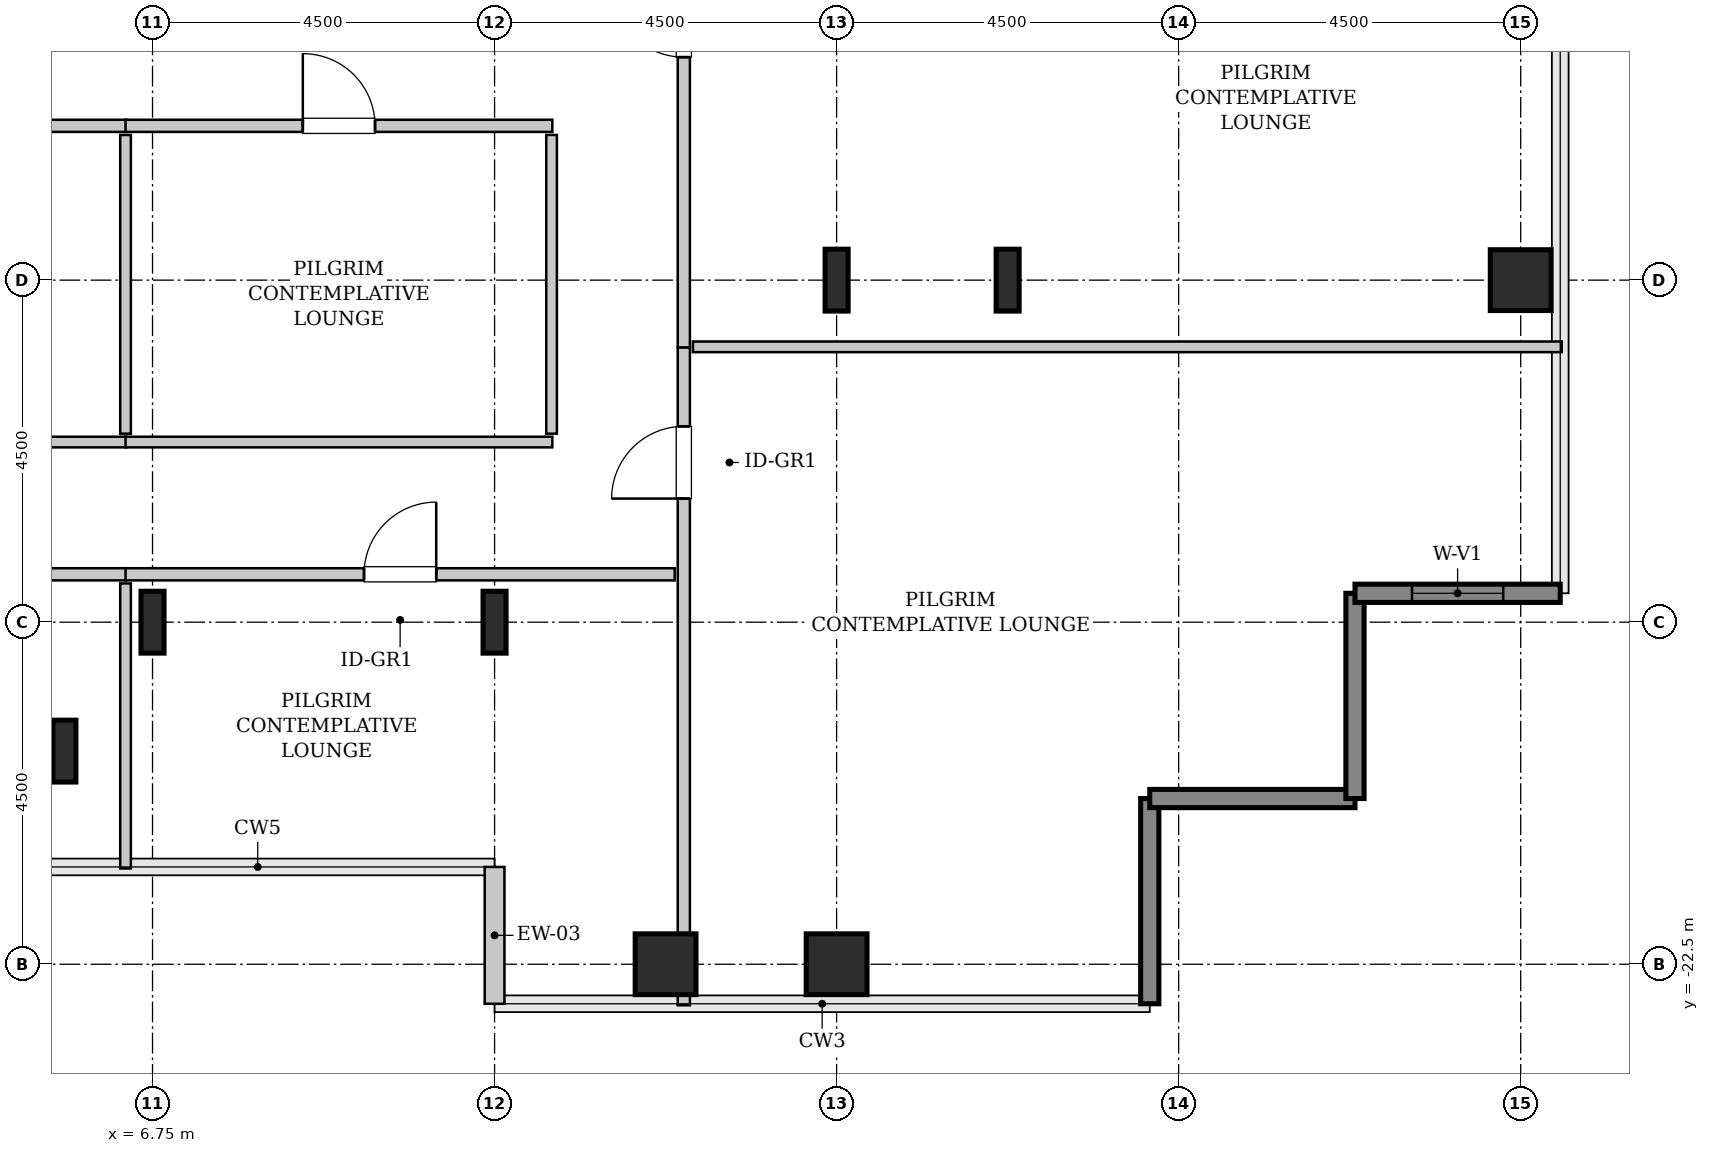
"""IFC4 building model, lengths in metres.
Left out: names, types, materials, properties, quantities, classifications, styles, units other than length and angle.
Written with IfcOpenShell. Run it as: python <this file> out.ifc"""

import sys

from ifc_helpers import new_model, si_unit, direction, frame, frame_2d, origin, origin_2d, place, context, subcontext, project, spatial, rectangle, hollow_rectangle, i_section, extrude, source, transform, mapped, element, fill, save


model = new_model("IFC4")
c1 = context("Model", 3, precision=1e-05, world=origin(), true_north=direction((0.0, 1.0)))
c2 = subcontext(c1, "Body", "Model", "MODEL_VIEW")
j1 = project(units=[si_unit("LENGTHUNIT", "METRE"), si_unit("PLANEANGLEUNIT", "RADIAN")], contexts=[c1])
p1 = place(None, origin())
s1 = spatial("IfcSite", under=j1, at=p1, CompositionType="ELEMENT")
p2 = place(p1, origin())
s2 = spatial("IfcBuilding", under=s1, at=p2, CompositionType="ELEMENT")
p3 = place(p2, frame((0.0, 0.0, 190.6)))
s3 = spatial("IfcBuildingStorey", under=s2, at=p3, CompositionType="ELEMENT", Elevation=190.6)
m1 = source(origin(), c2, "Body", "SweptSolid", [
    extrude(i_section(OverallWidth=0.303, OverallDepth=0.814, WebThickness=0.021, FlangeThickness=0.04, FilletRadius=0.03, at=origin_2d()), origin(), (0.0, 0.0, 1.0), 3.8),
])
for number, where, z_axis, x_axis in (
    (1, (5.591, -19.696, 0.0), (0.0, 0.0, 1.0), (1.0, 0.0, 0.0)),
    (2, (6.75, -18.0, 0.0), (0.0, 0.0, 1.0), (1.0, 0.0, 0.0)),
    (3, (11.25, -18.0, 0.0), (0.0, 0.0, 1.0), (1.0, 0.0, 0.0)),
):
    element("IfcColumn", number, at=place(p3, frame(where, z_axis=z_axis, x_axis=x_axis)), inside=s3, PredefinedType="COLUMN", context=c2, shape_type="MappedRepresentation", body=[
        mapped(m1, transform((0.0, 0.0, 0.0), x_axis=(1.0, 0.0, 0.0), y_axis=(0.0, 1.0, 0.0), z_axis=(0.0, 0.0, 1.0), scale=1.0)),
    ])
m2 = source(origin(), c2, "Body", "SweptSolid", [
    extrude(hollow_rectangle(XDim=0.8, YDim=0.8, WallThickness=0.04, InnerFilletRadius=0.04, OuterFilletRadius=0.08, at=origin_2d()), origin(), (0.0, 0.0, 1.0), 3.8),
])
for number, where, z_axis, x_axis in (
    (4, (13.5, -22.5, 0.0), (0.0, 0.0, 1.0), (1.0, 0.0, 0.0)),
    (5, (15.75, -22.5, 0.0), (0.0, 0.0, 1.0), (1.0, 0.0, 0.0)),
):
    element("IfcColumn", number, at=place(p3, frame(where, z_axis=z_axis, x_axis=x_axis)), inside=s3, PredefinedType="COLUMN", context=c2, shape_type="MappedRepresentation", body=[
        mapped(m2, transform((0.0, 0.0, 0.0), x_axis=(1.0, 0.0, 0.0), y_axis=(0.0, 1.0, 0.0), z_axis=(0.0, 0.0, 1.0), scale=1.0)),
    ])
for number, where, z_axis, x_axis in (
    (6, (15.75, -13.5, 0.0), (0.0, 0.0, 1.0), (1.0, 0.0, 0.0)),
    (7, (18.0, -13.5, 0.0), (0.0, 0.0, 1.0), (1.0, 0.0, 0.0)),
):
    element("IfcColumn", number, at=place(p3, frame(where, z_axis=z_axis, x_axis=x_axis)), inside=s3, PredefinedType="COLUMN", context=c2, shape_type="MappedRepresentation", body=[
        mapped(m1, transform((0.0, 0.0, 0.0), x_axis=(1.0, 0.0, 0.0), y_axis=(0.0, 1.0, 0.0), z_axis=(0.0, 0.0, 1.0), scale=1.0)),
    ])
p4 = place(p3, frame((24.75, -13.5, 0.0), z_axis=(0.0, 0.0, 1.0), x_axis=(1.0, 0.0, 0.0)))
e8 = element("IfcColumn", 8, at=p4, inside=s3, PredefinedType="COLUMN", context=c2, shape_type="MappedRepresentation", body=[
    mapped(m2, transform((0.0, 0.0, 0.0), x_axis=(1.0, 0.0, 0.0), y_axis=(0.0, 1.0, 0.0), z_axis=(0.0, 0.0, 1.0), scale=1.0)),
])
m3 = source(origin(), c2, "Body", "SweptSolid", [
    extrude(rectangle(XDim=1.8, YDim=0.26, at=frame_2d((0.9, 0.0))), origin(), (0.0, 0.0, 1.0), 3.55),
])
p5 = place(p3, frame((11.25, -21.22, 0.0), z_axis=(0.0, 0.0, 1.0), x_axis=(0.0, -1.0, 0.0)))
e9 = element("IfcWall", 9, at=p5, inside=s3, PredefinedType="SOLIDWALL", context=c2, shape_type="MappedRepresentation", body=[
    mapped(m3, transform((0.0, 0.0, 0.0), x_axis=(1.0, 0.0, 0.0), y_axis=(0.0, 1.0, 0.0), z_axis=(0.0, 0.0, 1.0), scale=1.0)),
])
m4 = source(origin(), c2, "Body", "SweptSolid", [
    extrude(rectangle(XDim=2.7, YDim=0.24, at=frame_2d((1.35, 0.0))), origin(), (0.0, 0.0, 1.0), 3.55),
])
for number, where, z_axis, x_axis in (
    (10, (19.87, -23.02, 0.0), (0.0, 0.0, 1.0), (0.0, 1.0, 0.0)),
    (11, (19.87, -20.32, 0.0), (0.0, 0.0, 1.0), (1.0, 0.0, 0.0)),
    (12, (22.57, -20.32, 0.0), (0.0, 0.0, 1.0), (0.0, 1.0, 0.0)),
):
    element("IfcWall", number, at=place(p3, frame(where, z_axis=z_axis, x_axis=x_axis)), inside=s3, PredefinedType="SHEAR", context=c2, shape_type="MappedRepresentation", body=[
        mapped(m4, transform((0.0, 0.0, 0.0), x_axis=(1.0, 0.0, 0.0), y_axis=(0.0, 1.0, 0.0), z_axis=(0.0, 0.0, 1.0), scale=1.0)),
    ])
p6 = place(p3, frame((22.57, -17.62, 0.0), z_axis=(0.0, 0.0, 1.0), x_axis=(1.0, 0.0, 0.0)))
e13 = element("IfcWall", 13, at=p6, inside=s3, PredefinedType="SHEAR", context=c2, shape_type="MappedRepresentation", body=[
    mapped(m4, transform((0.0, 0.0, 0.0), x_axis=(1.0, 0.0, 0.0), y_axis=(0.0, 1.0, 0.0), z_axis=(0.0, 0.0, 1.0), scale=1.0)),
])
p7 = place(p6, frame((0.75, 0.0, 0.85)))
e14 = element("IfcOpeningElement", 14, at=p7, cuts=e13, PredefinedType="OPENING", context=c2, shape_type="SweptSolid", body=[
    extrude(rectangle(XDim=1.2, YDim=1.8, at=frame_2d((0.6, 0.9))), frame((0.0, 0.13, 0.0), z_axis=(0.0, -1.0, 0.0), x_axis=(1.0, 0.0, 0.0)), (0.0, 0.0, 1.0), 0.26),
])
m5 = source(origin(), c2, "Body", "SweptSolid", [
    extrude(rectangle(XDim=8.593, YDim=0.16, at=frame_2d((4.296, 0.0))), origin(), (0.0, 0.0, 1.0), 3.535),
])
p8 = place(p3, frame((13.74, -14.387, 0.0), z_axis=(0.0, 0.0, 1.0), x_axis=(0.0, 1.0, 0.0)))
e15 = element("IfcWall", 15, at=p8, inside=s3, PredefinedType="PARTITIONING", context=c2, shape_type="MappedRepresentation", body=[
    mapped(m5, transform((0.0, 0.0, 0.0), x_axis=(1.0, 0.0, 0.0), y_axis=(0.0, 1.0, 0.0), z_axis=(0.0, 0.0, 1.0), scale=1.0)),
])
p9 = place(p8, frame((3.821, 0.0, 0.0)))
e16 = element("IfcOpeningElement", 16, at=p9, cuts=e15, PredefinedType="OPENING", context=c2, shape_type="SweptSolid", body=[
    extrude(rectangle(XDim=0.95, YDim=2.1, at=frame_2d((0.475, 1.05))), frame((0.0, 0.09, 0.0), z_axis=(0.0, -1.0, 0.0), x_axis=(1.0, 0.0, 0.0)), (0.0, 0.0, 1.0), 0.18),
])
m6 = source(origin(), c2, "Body", "SweptSolid", [
    extrude(rectangle(XDim=11.43, YDim=0.14, at=frame_2d((5.715, 0.0))), origin(), (0.0, 0.0, 1.0), 3.535),
])
p10 = place(p3, frame((13.86, -14.377, 0.0), z_axis=(0.0, 0.0, 1.0), x_axis=(1.0, 0.0, 0.0)))
e17 = element("IfcWall", 17, at=p10, inside=s3, PredefinedType="PARTITIONING", context=c2, shape_type="MappedRepresentation", body=[
    mapped(m6, transform((0.0, 0.0, 0.0), x_axis=(1.0, 0.0, 0.0), y_axis=(0.0, 1.0, 0.0), z_axis=(0.0, 0.0, 1.0), scale=1.0)),
])
m7 = source(origin(), c2, "Body", "SweptSolid", [
    extrude(rectangle(XDim=8.653, YDim=0.16, at=frame_2d((4.326, 0.0))), origin(), (0.0, 0.0, 1.0), 3.535),
])
p11 = place(p3, frame((13.74, -23.04, 0.0), z_axis=(0.0, 0.0, 1.0), x_axis=(0.0, 1.0, 0.0)))
e18 = element("IfcWall", 18, at=p11, inside=s3, PredefinedType="PARTITIONING", context=c2, shape_type="MappedRepresentation", body=[
    mapped(m7, transform((0.0, 0.0, 0.0), x_axis=(1.0, 0.0, 0.0), y_axis=(0.0, 1.0, 0.0), z_axis=(0.0, 0.0, 1.0), scale=1.0)),
])
p12 = place(p11, frame((6.666, 0.0, 0.0)))
e19 = element("IfcOpeningElement", 19, at=p12, cuts=e18, PredefinedType="OPENING", context=c2, shape_type="SweptSolid", body=[
    extrude(rectangle(XDim=0.95, YDim=2.1, at=frame_2d((0.475, 1.05))), frame((0.0, 0.09, 0.0), z_axis=(0.0, -1.0, 0.0), x_axis=(1.0, 0.0, 0.0)), (0.0, 0.0, 1.0), 0.18),
])
m8 = source(origin(), c2, "Body", "SweptSolid", [
    extrude(rectangle(XDim=12.81, YDim=0.16, at=frame_2d((6.405, 0.0))), origin(), (0.0, 0.0, 1.0), 3.535),
])
p13 = place(p3, frame((-6.405, -17.37, 0.0), z_axis=(0.0, 0.0, 1.0), x_axis=(1.0, 0.0, 0.0)))
e20 = element("IfcWall", 20, at=p13, inside=s3, PredefinedType="PARTITIONING", context=c2, shape_type="MappedRepresentation", body=[
    mapped(m8, transform((0.0, 0.0, 0.0), x_axis=(1.0, 0.0, 0.0), y_axis=(0.0, 1.0, 0.0), z_axis=(0.0, 0.0, 1.0), scale=1.0)),
])
p14 = place(p13, frame((5.93, 0.0, 0.0)))
e21 = element("IfcOpeningElement", 21, at=p14, cuts=e20, PredefinedType="OPENING", context=c2, shape_type="SweptSolid", body=[
    extrude(rectangle(XDim=0.95, YDim=2.1, at=frame_2d((0.475, 1.05))), frame((0.0, 0.09, 0.0), z_axis=(0.0, -1.0, 0.0), x_axis=(1.0, 0.0, 0.0)), (0.0, 0.0, 1.0), 0.18),
])
m9 = source(origin(), c2, "Body", "SweptSolid", [
    extrude(rectangle(XDim=3.75, YDim=0.14, at=frame_2d((1.875, 0.0))), origin(), (0.0, 0.0, 1.0), 3.535),
])
p15 = place(p3, frame((6.395, -21.24, 0.0), z_axis=(0.0, 0.0, 1.0), x_axis=(0.0, 1.0, 0.0)))
e22 = element("IfcWall", 22, at=p15, inside=s3, PredefinedType="PARTITIONING", context=c2, shape_type="MappedRepresentation", body=[
    mapped(m9, transform((0.0, 0.0, 0.0), x_axis=(1.0, 0.0, 0.0), y_axis=(0.0, 1.0, 0.0), z_axis=(0.0, 0.0, 1.0), scale=1.0)),
])
p16 = place(p3, frame((-6.405, -11.47, 0.0), z_axis=(0.0, 0.0, 1.0), x_axis=(1.0, 0.0, 0.0)))
e23 = element("IfcWall", 23, at=p16, inside=s3, PredefinedType="PARTITIONING", context=c2, shape_type="MappedRepresentation", body=[
    mapped(m8, transform((0.0, 0.0, 0.0), x_axis=(1.0, 0.0, 0.0), y_axis=(0.0, 1.0, 0.0), z_axis=(0.0, 0.0, 1.0), scale=1.0)),
])
p17 = place(p16, frame((5.93, 0.0, 0.0)))
e24 = element("IfcOpeningElement", 24, at=p17, cuts=e23, PredefinedType="OPENING", context=c2, shape_type="SweptSolid", body=[
    extrude(rectangle(XDim=0.95, YDim=2.1, at=frame_2d((0.475, 1.05))), frame((0.0, 0.09, 0.0), z_axis=(0.0, -1.0, 0.0), x_axis=(1.0, 0.0, 0.0)), (0.0, 0.0, 1.0), 0.18),
])
m10 = source(origin(), c2, "Body", "SweptSolid", [
    extrude(rectangle(XDim=12.81, YDim=0.14, at=frame_2d((6.405, 0.0))), origin(), (0.0, 0.0, 1.0), 3.535),
])
p18 = place(p3, frame((-6.405, -15.63, 0.0), z_axis=(0.0, 0.0, 1.0), x_axis=(1.0, 0.0, 0.0)))
e25 = element("IfcWall", 25, at=p18, inside=s3, PredefinedType="PARTITIONING", context=c2, shape_type="MappedRepresentation", body=[
    mapped(m10, transform((0.0, 0.0, 0.0), x_axis=(1.0, 0.0, 0.0), y_axis=(0.0, 1.0, 0.0), z_axis=(0.0, 0.0, 1.0), scale=1.0)),
])
m11 = source(origin(), c2, "Body", "SweptSolid", [
    extrude(rectangle(XDim=3.93, YDim=0.14, at=frame_2d((1.965, 0.0))), origin(), (0.0, 0.0, 1.0), 3.535),
])
p19 = place(p3, frame((6.395, -15.52, 0.0), z_axis=(0.0, 0.0, 1.0), x_axis=(0.0, 1.0, 0.0)))
e26 = element("IfcWall", 26, at=p19, inside=s3, PredefinedType="PARTITIONING", context=c2, shape_type="MappedRepresentation", body=[
    mapped(m11, transform((0.0, 0.0, 0.0), x_axis=(1.0, 0.0, 0.0), y_axis=(0.0, 1.0, 0.0), z_axis=(0.0, 0.0, 1.0), scale=1.0)),
])
m12 = source(origin(), c2, "Body", "SweptSolid", [
    extrude(rectangle(XDim=7.225, YDim=0.16, at=frame_2d((3.613, 0.0))), origin(), (0.0, 0.0, 1.0), 3.535),
])
p20 = place(p3, frame((6.395, -17.37, 0.0), z_axis=(0.0, 0.0, 1.0), x_axis=(1.0, 0.0, 0.0)))
e27 = element("IfcWall", 27, at=p20, inside=s3, PredefinedType="PARTITIONING", context=c2, shape_type="MappedRepresentation", body=[
    mapped(m12, transform((0.0, 0.0, 0.0), x_axis=(1.0, 0.0, 0.0), y_axis=(0.0, 1.0, 0.0), z_axis=(0.0, 0.0, 1.0), scale=1.0)),
])
p21 = place(p20, frame((3.137, 0.0, 0.0)))
e28 = element("IfcOpeningElement", 28, at=p21, cuts=e27, PredefinedType="OPENING", context=c2, shape_type="SweptSolid", body=[
    extrude(rectangle(XDim=0.95, YDim=2.1, at=frame_2d((0.475, 1.05))), frame((0.0, 0.09, 0.0), z_axis=(0.0, -1.0, 0.0), x_axis=(1.0, 0.0, 0.0)), (0.0, 0.0, 1.0), 0.18),
])
m13 = source(origin(), c2, "Body", "SweptSolid", [
    extrude(rectangle(XDim=5.615, YDim=0.16, at=frame_2d((2.808, 0.0))), origin(), (0.0, 0.0, 1.0), 3.535),
])
p22 = place(p3, frame((6.395, -11.47, 0.0), z_axis=(0.0, 0.0, 1.0), x_axis=(1.0, 0.0, 0.0)))
e29 = element("IfcWall", 29, at=p22, inside=s3, PredefinedType="PARTITIONING", context=c2, shape_type="MappedRepresentation", body=[
    mapped(m13, transform((0.0, 0.0, 0.0), x_axis=(1.0, 0.0, 0.0), y_axis=(0.0, 1.0, 0.0), z_axis=(0.0, 0.0, 1.0), scale=1.0)),
])
p23 = place(p22, frame((2.333, 0.0, 0.0)))
e30 = element("IfcOpeningElement", 30, at=p23, cuts=e29, PredefinedType="OPENING", context=c2, shape_type="SweptSolid", body=[
    extrude(rectangle(XDim=0.95, YDim=2.1, at=frame_2d((0.475, 1.05))), frame((0.0, 0.09, 0.0), z_axis=(0.0, -1.0, 0.0), x_axis=(1.0, 0.0, 0.0)), (0.0, 0.0, 1.0), 0.18),
])
m14 = source(origin(), c2, "Body", "SweptSolid", [
    extrude(rectangle(XDim=5.615, YDim=0.14, at=frame_2d((2.808, 0.0))), origin(), (0.0, 0.0, 1.0), 3.535),
])
p24 = place(p3, frame((6.395, -15.63, 0.0), z_axis=(0.0, 0.0, 1.0), x_axis=(1.0, 0.0, 0.0)))
e31 = element("IfcWall", 31, at=p24, inside=s3, PredefinedType="PARTITIONING", context=c2, shape_type="MappedRepresentation", body=[
    mapped(m14, transform((0.0, 0.0, 0.0), x_axis=(1.0, 0.0, 0.0), y_axis=(0.0, 1.0, 0.0), z_axis=(0.0, 0.0, 1.0), scale=1.0)),
])
p25 = place(p3, frame((12.0, -15.52, 0.0), z_axis=(0.0, 0.0, 1.0), x_axis=(0.0, 1.0, 0.0)))
e32 = element("IfcWall", 32, at=p25, inside=s3, PredefinedType="PARTITIONING", context=c2, shape_type="MappedRepresentation", body=[
    mapped(m11, transform((0.0, 0.0, 0.0), x_axis=(1.0, 0.0, 0.0), y_axis=(0.0, 1.0, 0.0), z_axis=(0.0, 0.0, 1.0), scale=1.0)),
])
m15 = source(origin(), c2, "Body", "SweptSolid", [
    extrude(rectangle(XDim=1.2, YDim=1.8, at=frame_2d((0.6, 0.9))), frame((0.0, 0.03, 0.0), z_axis=(0.0, -1.0, 0.0), x_axis=(1.0, 0.0, 0.0)), (0.0, 0.0, 1.0), 0.06),
])
p26 = place(p7, origin())
e33 = element("IfcWindow", 33, at=p26, inside=s3, PartitioningType="SINGLE_PANEL", PredefinedType="WINDOW", context=c2, shape_type="MappedRepresentation", body=[
    mapped(m15, transform((0.0, 0.0, 0.0), x_axis=(1.0, 0.0, 0.0), y_axis=(0.0, 1.0, 0.0), z_axis=(0.0, 0.0, 1.0), scale=1.0)),
])
fill(e14, e33)
m16 = source(origin(), c2, "Body", "SweptSolid", [
    extrude(rectangle(XDim=0.95, YDim=2.1, at=frame_2d((0.475, 1.05))), frame((0.0, 0.025, 0.0), z_axis=(0.0, -1.0, 0.0), x_axis=(1.0, 0.0, 0.0)), (0.0, 0.0, 1.0), 0.05),
])
p27 = place(p9, origin())
e34 = element("IfcDoor", 34, at=p27, inside=s3, OperationType="SINGLE_SWING_RIGHT", PredefinedType="DOOR", context=c2, shape_type="MappedRepresentation", body=[
    mapped(m16, transform((0.0, 0.0, 0.0), x_axis=(1.0, 0.0, 0.0), y_axis=(0.0, 1.0, 0.0), z_axis=(0.0, 0.0, 1.0), scale=1.0)),
])
fill(e16, e34)
p28 = place(p12, origin())
e35 = element("IfcDoor", 35, at=p28, inside=s3, OperationType="SINGLE_SWING_LEFT", PredefinedType="DOOR", context=c2, shape_type="MappedRepresentation", body=[
    mapped(m16, transform((0.0, 0.0, 0.0), x_axis=(1.0, 0.0, 0.0), y_axis=(0.0, 1.0, 0.0), z_axis=(0.0, 0.0, 1.0), scale=1.0)),
])
fill(e19, e35)
p29 = place(p21, origin())
e36 = element("IfcDoor", 36, at=p29, inside=s3, OperationType="SINGLE_SWING_RIGHT", PredefinedType="DOOR", context=c2, shape_type="MappedRepresentation", body=[
    mapped(m16, transform((0.0, 0.0, 0.0), x_axis=(1.0, 0.0, 0.0), y_axis=(0.0, 1.0, 0.0), z_axis=(0.0, 0.0, 1.0), scale=1.0)),
])
fill(e28, e36)
p30 = place(p23, origin())
e37 = element("IfcDoor", 37, at=p30, inside=s3, OperationType="SINGLE_SWING_LEFT", PredefinedType="DOOR", context=c2, shape_type="MappedRepresentation", body=[
    mapped(m16, transform((0.0, 0.0, 0.0), x_axis=(1.0, 0.0, 0.0), y_axis=(0.0, 1.0, 0.0), z_axis=(0.0, 0.0, 1.0), scale=1.0)),
])
fill(e30, e37)
save(model, sys.argv[1])
